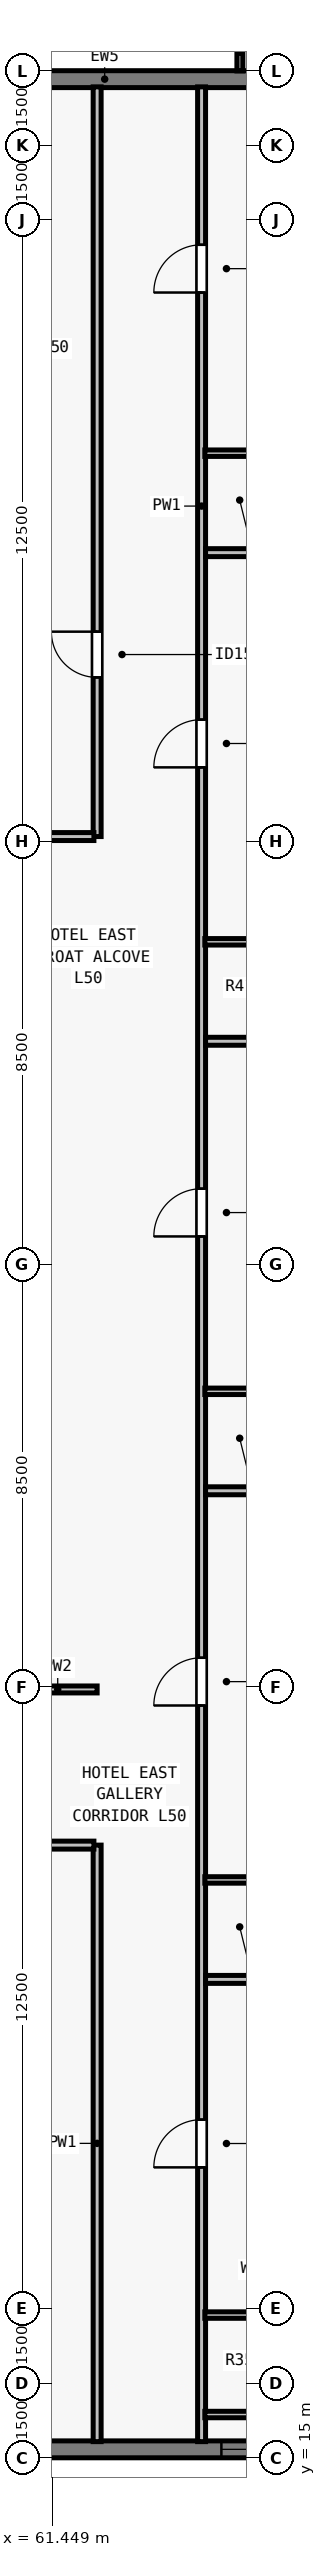
"""IFC4 building model, lengths in metres.
Left out: names, types, materials, properties, quantities, classifications, styles, units other than length and angle.
Written with IfcOpenShell. Run it as: python <this file> out.ifc"""

import sys

from ifc_helpers import new_model, si_unit, direction, frame, frame_2d, origin, place, context, subcontext, project, spatial, rectangle, extrude, element, fill, save


model = new_model("IFC4")
c1 = context("Model", 3, precision=1e-05, world=origin(), true_north=direction((0.0, 1.0)))
c2 = subcontext(c1, "Body", "Model", "MODEL_VIEW")
j1 = project(units=[si_unit("LENGTHUNIT", "METRE"), si_unit("PLANEANGLEUNIT", "RADIAN")], contexts=[c1])
p1 = place(None, origin())
s1 = spatial("IfcSite", under=j1, at=p1, CompositionType="ELEMENT")
p2 = place(p1, origin())
s2 = spatial("IfcBuilding", under=s1, at=p2, CompositionType="ELEMENT")
p3 = place(p2, frame((0.0, 0.0, 183.0)))
s3 = spatial("IfcBuildingStorey", under=s2, at=p3, CompositionType="ELEMENT", Elevation=183.0)
p4 = place(p3, frame((72.0, 15.17, 0.0), z_axis=(0.0, 0.0, 1.0), x_axis=(-1.0, 0.0, 0.0)))
e1 = element("IfcWall", 1, at=p4, inside=s3, PredefinedType="SOLIDWALL", context=c2, shape_type="SweptSolid", body=[
    extrude(rectangle(XDim=39.682, YDim=0.34, at=frame_2d((19.841, 0.0))), origin(), (0.0, 0.0, 1.0), 3.28),
])
p5 = place(p4, frame((5.802, 0.0, 0.8)))
e2 = element("IfcOpeningElement", 2, at=p5, cuts=e1, PredefinedType="OPENING", context=c2, shape_type="SweptSolid", body=[
    extrude(rectangle(XDim=1.35, YDim=1.66, at=frame_2d((0.675, 0.83))), frame((0.0, 0.18, 0.0), z_axis=(0.0, -1.0, 0.0), x_axis=(1.0, 0.0, 0.0)), (0.0, 0.0, 1.0), 0.36),
])
p6 = place(p4, frame((12.059, 0.0, 0.8)))
e3 = element("IfcOpeningElement", 3, at=p6, cuts=e1, PredefinedType="OPENING", context=c2, shape_type="SweptSolid", body=[
    extrude(rectangle(XDim=1.35, YDim=1.66, at=frame_2d((0.675, 0.83))), frame((0.0, 0.18, 0.0), z_axis=(0.0, -1.0, 0.0), x_axis=(1.0, 0.0, 0.0)), (0.0, 0.0, 1.0), 0.36),
])
p7 = place(p4, frame((19.166, 0.0, 0.8)))
e4 = element("IfcOpeningElement", 4, at=p7, cuts=e1, PredefinedType="OPENING", context=c2, shape_type="SweptSolid", body=[
    extrude(rectangle(XDim=1.35, YDim=1.66, at=frame_2d((0.675, 0.83))), frame((0.0, 0.18, 0.0), z_axis=(0.0, -1.0, 0.0), x_axis=(1.0, 0.0, 0.0)), (0.0, 0.0, 1.0), 0.36),
])
p8 = place(p4, frame((21.67, 0.0, 0.8)))
e5 = element("IfcOpeningElement", 5, at=p8, cuts=e1, PredefinedType="OPENING", context=c2, shape_type="SweptSolid", body=[
    extrude(rectangle(XDim=1.75, YDim=1.66, at=frame_2d((0.875, 0.83))), frame((0.0, 0.18, 0.0), z_axis=(0.0, -1.0, 0.0), x_axis=(1.0, 0.0, 0.0)), (0.0, 0.0, 1.0), 0.36),
])
p9 = place(p4, frame((26.273, 0.0, 0.8)))
e6 = element("IfcOpeningElement", 6, at=p9, cuts=e1, PredefinedType="OPENING", context=c2, shape_type="SweptSolid", body=[
    extrude(rectangle(XDim=1.35, YDim=1.66, at=frame_2d((0.675, 0.83))), frame((0.0, 0.18, 0.0), z_axis=(0.0, -1.0, 0.0), x_axis=(1.0, 0.0, 0.0)), (0.0, 0.0, 1.0), 0.36),
])
p10 = place(p4, frame((29.627, 0.0, 0.8)))
e7 = element("IfcOpeningElement", 7, at=p10, cuts=e1, PredefinedType="OPENING", context=c2, shape_type="SweptSolid", body=[
    extrude(rectangle(XDim=1.75, YDim=1.66, at=frame_2d((0.875, 0.83))), frame((0.0, 0.18, 0.0), z_axis=(0.0, -1.0, 0.0), x_axis=(1.0, 0.0, 0.0)), (0.0, 0.0, 1.0), 0.36),
])
p11 = place(p3, frame((32.0, 62.83, 0.0), z_axis=(0.0, 0.0, 1.0), x_axis=(1.0, 0.0, 0.0)))
e8 = element("IfcWall", 8, at=p11, inside=s3, PredefinedType="SOLIDWALL", context=c2, shape_type="SweptSolid", body=[
    extrude(rectangle(XDim=39.682, YDim=0.34, at=frame_2d((19.841, 0.0))), origin(), (0.0, 0.0, 1.0), 3.28),
])
p12 = place(p11, frame((4.102, 0.0, 0.8)))
e9 = element("IfcOpeningElement", 9, at=p12, cuts=e8, PredefinedType="OPENING", context=c2, shape_type="SweptSolid", body=[
    extrude(rectangle(XDim=1.35, YDim=1.66, at=frame_2d((0.675, 0.83))), frame((0.0, 0.18, 0.0), z_axis=(0.0, -1.0, 0.0), x_axis=(1.0, 0.0, 0.0)), (0.0, 0.0, 1.0), 0.36),
])
p13 = place(p11, frame((8.755, 0.0, 0.8)))
e10 = element("IfcOpeningElement", 10, at=p13, cuts=e8, PredefinedType="OPENING", context=c2, shape_type="SweptSolid", body=[
    extrude(rectangle(XDim=1.75, YDim=1.66, at=frame_2d((0.875, 0.83))), frame((0.0, 0.18, 0.0), z_axis=(0.0, -1.0, 0.0), x_axis=(1.0, 0.0, 0.0)), (0.0, 0.0, 1.0), 0.36),
])
p14 = place(p11, frame((12.059, 0.0, 0.8)))
e11 = element("IfcOpeningElement", 11, at=p14, cuts=e8, PredefinedType="OPENING", context=c2, shape_type="SweptSolid", body=[
    extrude(rectangle(XDim=1.35, YDim=1.66, at=frame_2d((0.675, 0.83))), frame((0.0, 0.18, 0.0), z_axis=(0.0, -1.0, 0.0), x_axis=(1.0, 0.0, 0.0)), (0.0, 0.0, 1.0), 0.36),
])
p15 = place(p11, frame((16.262, 0.0, 0.8)))
e12 = element("IfcOpeningElement", 12, at=p15, cuts=e8, PredefinedType="OPENING", context=c2, shape_type="SweptSolid", body=[
    extrude(rectangle(XDim=1.75, YDim=1.66, at=frame_2d((0.875, 0.83))), frame((0.0, 0.18, 0.0), z_axis=(0.0, -1.0, 0.0), x_axis=(1.0, 0.0, 0.0)), (0.0, 0.0, 1.0), 0.36),
])
p16 = place(p11, frame((18.316, 0.0, 0.8)))
e13 = element("IfcOpeningElement", 13, at=p16, cuts=e8, PredefinedType="OPENING", context=c2, shape_type="SweptSolid", body=[
    extrude(rectangle(XDim=1.35, YDim=1.66, at=frame_2d((0.675, 0.83))), frame((0.0, 0.18, 0.0), z_axis=(0.0, -1.0, 0.0), x_axis=(1.0, 0.0, 0.0)), (0.0, 0.0, 1.0), 0.36),
])
p17 = place(p11, frame((22.07, 0.0, 0.8)))
e14 = element("IfcOpeningElement", 14, at=p17, cuts=e8, PredefinedType="OPENING", context=c2, shape_type="SweptSolid", body=[
    extrude(rectangle(XDim=1.75, YDim=1.66, at=frame_2d((0.875, 0.83))), frame((0.0, 0.18, 0.0), z_axis=(0.0, -1.0, 0.0), x_axis=(1.0, 0.0, 0.0)), (0.0, 0.0, 1.0), 0.36),
])
p18 = place(p11, frame((26.273, 0.0, 0.8)))
e15 = element("IfcOpeningElement", 15, at=p18, cuts=e8, PredefinedType="OPENING", context=c2, shape_type="SweptSolid", body=[
    extrude(rectangle(XDim=1.35, YDim=1.66, at=frame_2d((0.675, 0.83))), frame((0.0, 0.18, 0.0), z_axis=(0.0, -1.0, 0.0), x_axis=(1.0, 0.0, 0.0)), (0.0, 0.0, 1.0), 0.36),
])
p19 = place(p11, frame((33.38, 0.0, 0.8)))
e16 = element("IfcOpeningElement", 16, at=p19, cuts=e8, PredefinedType="OPENING", context=c2, shape_type="SweptSolid", body=[
    extrude(rectangle(XDim=1.35, YDim=1.66, at=frame_2d((0.675, 0.83))), frame((0.0, 0.18, 0.0), z_axis=(0.0, -1.0, 0.0), x_axis=(1.0, 0.0, 0.0)), (0.0, 0.0, 1.0), 0.36),
])
p20 = place(p3, frame((64.45, 15.325, 0.0), z_axis=(0.0, 0.0, 1.0), x_axis=(0.0, 1.0, 0.0)))
e17 = element("IfcWall", 17, at=p20, inside=s3, PredefinedType="PARTITIONING", context=c2, shape_type="SweptSolid", body=[
    extrude(rectangle(XDim=47.35, YDim=0.16, at=frame_2d((23.675, 0.0))), origin(), (0.0, 0.0, 1.0), 2.555),
])
p21 = place(p20, frame((5.515, 0.0, 0.0)))
e18 = element("IfcOpeningElement", 18, at=p21, cuts=e17, PredefinedType="OPENING", context=c2, shape_type="SweptSolid", body=[
    extrude(rectangle(XDim=0.96, YDim=2.15, at=frame_2d((0.48, 1.075))), frame((0.0, 0.09, 0.0), z_axis=(0.0, -1.0, 0.0), x_axis=(1.0, 0.0, 0.0)), (0.0, 0.0, 1.0), 0.18),
])
p22 = place(p20, frame((14.802, 0.0, 0.0)))
e19 = element("IfcOpeningElement", 19, at=p22, cuts=e17, PredefinedType="OPENING", context=c2, shape_type="SweptSolid", body=[
    extrude(rectangle(XDim=0.96, YDim=2.15, at=frame_2d((0.48, 1.075))), frame((0.0, 0.09, 0.0), z_axis=(0.0, -1.0, 0.0), x_axis=(1.0, 0.0, 0.0)), (0.0, 0.0, 1.0), 0.18),
])
p23 = place(p20, frame((24.234, 0.0, 0.0)))
e20 = element("IfcOpeningElement", 20, at=p23, cuts=e17, PredefinedType="OPENING", context=c2, shape_type="SweptSolid", body=[
    extrude(rectangle(XDim=0.96, YDim=2.15, at=frame_2d((0.48, 1.075))), frame((0.0, 0.09, 0.0), z_axis=(0.0, -1.0, 0.0), x_axis=(1.0, 0.0, 0.0)), (0.0, 0.0, 1.0), 0.18),
])
p24 = place(p20, frame((33.666, 0.0, 0.0)))
e21 = element("IfcOpeningElement", 21, at=p24, cuts=e17, PredefinedType="OPENING", context=c2, shape_type="SweptSolid", body=[
    extrude(rectangle(XDim=0.96, YDim=2.15, at=frame_2d((0.48, 1.075))), frame((0.0, 0.09, 0.0), z_axis=(0.0, -1.0, 0.0), x_axis=(1.0, 0.0, 0.0)), (0.0, 0.0, 1.0), 0.18),
])
p25 = place(p20, frame((43.214, 0.0, 0.0)))
e22 = element("IfcOpeningElement", 22, at=p25, cuts=e17, PredefinedType="OPENING", context=c2, shape_type="SweptSolid", body=[
    extrude(rectangle(XDim=0.96, YDim=2.15, at=frame_2d((0.48, 1.075))), frame((0.0, 0.09, 0.0), z_axis=(0.0, -1.0, 0.0), x_axis=(1.0, 0.0, 0.0)), (0.0, 0.0, 1.0), 0.18),
])
p26 = place(p3, frame((62.35, 15.325, 0.0), z_axis=(0.0, 0.0, 1.0), x_axis=(0.0, 1.0, 0.0)))
e23 = element("IfcWall", 23, at=p26, inside=s3, PredefinedType="PARTITIONING", context=c2, shape_type="SweptSolid", body=[
    extrude(rectangle(XDim=11.995, YDim=0.16, at=frame_2d((5.998, 0.0))), origin(), (0.0, 0.0, 1.0), 3.28),
])
p27 = place(p3, frame((62.35, 47.6, 0.0), z_axis=(0.0, 0.0, 1.0), x_axis=(0.0, 1.0, 0.0)))
e24 = element("IfcWall", 24, at=p27, inside=s3, PredefinedType="PARTITIONING", context=c2, shape_type="SweptSolid", body=[
    extrude(rectangle(XDim=15.075, YDim=0.16, at=frame_2d((7.538, 0.0))), origin(), (0.0, 0.0, 1.0), 2.555),
])
p28 = place(p27, frame((3.2, 0.0, 0.0)))
e25 = element("IfcOpeningElement", 25, at=p28, cuts=e24, PredefinedType="OPENING", context=c2, shape_type="SweptSolid", body=[
    extrude(rectangle(XDim=0.92, YDim=2.12, at=frame_2d((0.46, 1.06))), frame((0.0, 0.09, 0.0), z_axis=(0.0, -1.0, 0.0), x_axis=(1.0, 0.0, 0.0)), (0.0, 0.0, 1.0), 0.18),
])
p29 = place(p3, frame((60.765, 30.45, 0.0), z_axis=(0.0, 0.0, 1.0), x_axis=(1.0, 0.0, 0.0)))
e26 = element("IfcWall", 26, at=p29, inside=s3, PredefinedType="PARTITIONING", context=c2, shape_type="SweptSolid", body=[
    extrude(rectangle(XDim=1.585, YDim=0.14, at=frame_2d((0.792, 0.0))), origin(), (0.0, 0.0, 1.0), 3.28),
])
p30 = place(p3, frame((60.765, 47.6, 0.0), z_axis=(0.0, 0.0, 1.0), x_axis=(1.0, 0.0, 0.0)))
e27 = element("IfcWall", 27, at=p30, inside=s3, PredefinedType="PARTITIONING", context=c2, shape_type="SweptSolid", body=[
    extrude(rectangle(XDim=1.52, YDim=0.16, at=frame_2d((0.76, 0.0))), origin(), (0.0, 0.0, 1.0), 3.28),
])
p31 = place(p3, frame((40.215, 27.32, 0.0), z_axis=(0.0, 0.0, 1.0), x_axis=(1.0, 0.0, 0.0)))
e28 = element("IfcWall", 28, at=p31, inside=s3, PredefinedType="PARTITIONING", context=c2, shape_type="SweptSolid", body=[
    extrude(rectangle(XDim=22.07, YDim=0.16, at=frame_2d((11.035, 0.0))), origin(), (0.0, 0.0, 1.0), 3.28),
])
p32 = place(p31, frame((3.587, 0.0, 0.0)))
e29 = element("IfcOpeningElement", 29, at=p32, cuts=e28, PredefinedType="OPENING", context=c2, shape_type="SweptSolid", body=[
    extrude(rectangle(XDim=0.96, YDim=2.12, at=frame_2d((0.48, 1.06))), frame((0.0, 0.09, 0.0), z_axis=(0.0, -1.0, 0.0), x_axis=(1.0, 0.0, 0.0)), (0.0, 0.0, 1.0), 0.18),
])
p33 = place(p31, frame((10.61, 0.0, 0.0)))
e30 = element("IfcOpeningElement", 30, at=p33, cuts=e28, PredefinedType="OPENING", context=c2, shape_type="SweptSolid", body=[
    extrude(rectangle(XDim=0.96, YDim=2.12, at=frame_2d((0.48, 1.06))), frame((0.0, 0.09, 0.0), z_axis=(0.0, -1.0, 0.0), x_axis=(1.0, 0.0, 0.0)), (0.0, 0.0, 1.0), 0.18),
])
p34 = place(p31, frame((17.578, 0.0, 0.0)))
e31 = element("IfcOpeningElement", 31, at=p34, cuts=e28, PredefinedType="OPENING", context=c2, shape_type="SweptSolid", body=[
    extrude(rectangle(XDim=0.96, YDim=2.12, at=frame_2d((0.48, 1.06))), frame((0.0, 0.09, 0.0), z_axis=(0.0, -1.0, 0.0), x_axis=(1.0, 0.0, 0.0)), (0.0, 0.0, 1.0), 0.18),
])
for number, where, z_axis, x_axis in (
    (32, (64.515, 15.87, 0.0), (0.0, 0.0, 1.0), (1.0, 0.0, 0.0)),
    (33, (64.515, 17.87, 0.0), (0.0, 0.0, 1.0), (1.0, 0.0, 0.0)),
):
    element("IfcWall", number, at=place(p3, frame(where, z_axis=z_axis, x_axis=x_axis)), inside=s3, PredefinedType="PLUMBINGWALL", context=c2, shape_type="SweptSolid", body=[
        extrude(rectangle(XDim=2.315, YDim=0.13, at=frame_2d((1.158, 0.0))), origin(), (0.0, 0.0, 1.0), 3.28),
    ])
p35 = place(p3, frame((64.53, 24.62, 0.0), z_axis=(0.0, 0.0, 1.0), x_axis=(1.0, 0.0, 0.0)))
e34 = element("IfcWall", 34, at=p35, inside=s3, PredefinedType="PARTITIONING", context=c2, shape_type="SweptSolid", body=[
    extrude(rectangle(XDim=11.145, YDim=0.16, at=frame_2d((5.573, 0.0))), origin(), (0.0, 0.0, 1.0), 2.896),
])
p36 = place(p3, frame((64.515, 26.62, 0.0), z_axis=(0.0, 0.0, 1.0), x_axis=(1.0, 0.0, 0.0)))
e35 = element("IfcWall", 35, at=p36, inside=s3, PredefinedType="PLUMBINGWALL", context=c2, shape_type="SweptSolid", body=[
    extrude(rectangle(XDim=2.315, YDim=0.13, at=frame_2d((1.158, 0.0))), origin(), (0.0, 0.0, 1.0), 2.896),
])
p37 = place(p3, frame((64.53, 34.445, 0.0), z_axis=(0.0, 0.0, 1.0), x_axis=(1.0, 0.0, 0.0)))
e36 = element("IfcWall", 36, at=p37, inside=s3, PredefinedType="PARTITIONING", context=c2, shape_type="SweptSolid", body=[
    extrude(rectangle(XDim=9.208, YDim=0.16, at=frame_2d((4.604, 0.0))), origin(), (0.0, 0.0, 1.0), 3.28),
])
p38 = place(p3, frame((64.515, 36.445, 0.0), z_axis=(0.0, 0.0, 1.0), x_axis=(1.0, 0.0, 0.0)))
e37 = element("IfcWall", 37, at=p38, inside=s3, PredefinedType="PLUMBINGWALL", context=c2, shape_type="SweptSolid", body=[
    extrude(rectangle(XDim=2.315, YDim=0.13, at=frame_2d((1.158, 0.0))), origin(), (0.0, 0.0, 1.0), 3.28),
])
p39 = place(p3, frame((64.53, 43.484, 0.0), z_axis=(0.0, 0.0, 1.0), x_axis=(1.0, 0.0, 0.0)))
e38 = element("IfcWall", 38, at=p39, inside=s3, PredefinedType="PARTITIONING", context=c2, shape_type="SweptSolid", body=[
    extrude(rectangle(XDim=11.145, YDim=0.16, at=frame_2d((5.573, 0.0))), origin(), (0.0, 0.0, 1.0), 3.28),
])
p40 = place(p3, frame((64.515, 45.484, 0.0), z_axis=(0.0, 0.0, 1.0), x_axis=(1.0, 0.0, 0.0)))
e39 = element("IfcWall", 39, at=p40, inside=s3, PredefinedType="PLUMBINGWALL", context=c2, shape_type="SweptSolid", body=[
    extrude(rectangle(XDim=2.315, YDim=0.13, at=frame_2d((1.158, 0.0))), origin(), (0.0, 0.0, 1.0), 3.28),
])
p41 = place(p3, frame((64.53, 53.309, 0.0), z_axis=(0.0, 0.0, 1.0), x_axis=(1.0, 0.0, 0.0)))
e40 = element("IfcWall", 40, at=p41, inside=s3, PredefinedType="PARTITIONING", context=c2, shape_type="SweptSolid", body=[
    extrude(rectangle(XDim=11.145, YDim=0.16, at=frame_2d((5.573, 0.0))), origin(), (0.0, 0.0, 1.0), 2.896),
])
p42 = place(p3, frame((64.515, 55.309, 0.0), z_axis=(0.0, 0.0, 1.0), x_axis=(1.0, 0.0, 0.0)))
e41 = element("IfcWall", 41, at=p42, inside=s3, PredefinedType="PLUMBINGWALL", context=c2, shape_type="SweptSolid", body=[
    extrude(rectangle(XDim=2.315, YDim=0.13, at=frame_2d((1.158, 0.0))), origin(), (0.0, 0.0, 1.0), 3.28),
])
p43 = place(p5, origin())
e42 = element("IfcWindow", 42, at=p43, inside=s3, PartitioningType="SINGLE_PANEL", PredefinedType="WINDOW", context=c2, shape_type="SweptSolid", body=[
    extrude(rectangle(XDim=1.35, YDim=1.66, at=frame_2d((0.675, 0.83))), frame((0.0, -0.05, 0.0), z_axis=(0.0, -1.0, 0.0), x_axis=(1.0, 0.0, 0.0)), (0.0, 0.0, 1.0), 0.06),
])
fill(e2, e42)
p44 = place(p28, origin())
e43 = element("IfcDoor", 43, at=p44, inside=s3, OperationType="SINGLE_SWING_RIGHT", PredefinedType="DOOR", context=c2, shape_type="SweptSolid", body=[
    extrude(rectangle(XDim=0.92, YDim=2.12, at=frame_2d((0.46, 1.06))), frame((0.0, 0.025, 0.0), z_axis=(0.0, -1.0, 0.0), x_axis=(1.0, 0.0, 0.0)), (0.0, 0.0, 1.0), 0.05),
])
fill(e25, e43)
p45 = place(p21, origin())
e44 = element("IfcDoor", 44, at=p45, inside=s3, OperationType="SINGLE_SWING_LEFT", PredefinedType="DOOR", context=c2, shape_type="SweptSolid", body=[
    extrude(rectangle(XDim=0.96, YDim=2.15, at=frame_2d((0.48, 1.075))), frame((0.0, 0.025, 0.0), z_axis=(0.0, -1.0, 0.0), x_axis=(1.0, 0.0, 0.0)), (0.0, 0.0, 1.0), 0.05),
])
fill(e18, e44)
p46 = place(p22, origin())
e45 = element("IfcDoor", 45, at=p46, inside=s3, OperationType="SINGLE_SWING_LEFT", PredefinedType="DOOR", context=c2, shape_type="SweptSolid", body=[
    extrude(rectangle(XDim=0.96, YDim=2.15, at=frame_2d((0.48, 1.075))), frame((0.0, 0.025, 0.0), z_axis=(0.0, -1.0, 0.0), x_axis=(1.0, 0.0, 0.0)), (0.0, 0.0, 1.0), 0.05),
])
fill(e19, e45)
p47 = place(p23, origin())
e46 = element("IfcDoor", 46, at=p47, inside=s3, OperationType="SINGLE_SWING_LEFT", PredefinedType="DOOR", context=c2, shape_type="SweptSolid", body=[
    extrude(rectangle(XDim=0.96, YDim=2.15, at=frame_2d((0.48, 1.075))), frame((0.0, 0.025, 0.0), z_axis=(0.0, -1.0, 0.0), x_axis=(1.0, 0.0, 0.0)), (0.0, 0.0, 1.0), 0.05),
])
fill(e20, e46)
p48 = place(p24, origin())
e47 = element("IfcDoor", 47, at=p48, inside=s3, OperationType="SINGLE_SWING_LEFT", PredefinedType="DOOR", context=c2, shape_type="SweptSolid", body=[
    extrude(rectangle(XDim=0.96, YDim=2.15, at=frame_2d((0.48, 1.075))), frame((0.0, 0.025, 0.0), z_axis=(0.0, -1.0, 0.0), x_axis=(1.0, 0.0, 0.0)), (0.0, 0.0, 1.0), 0.05),
])
fill(e21, e47)
p49 = place(p25, origin())
e48 = element("IfcDoor", 48, at=p49, inside=s3, OperationType="SINGLE_SWING_LEFT", PredefinedType="DOOR", context=c2, shape_type="SweptSolid", body=[
    extrude(rectangle(XDim=0.96, YDim=2.15, at=frame_2d((0.48, 1.075))), frame((0.0, 0.025, 0.0), z_axis=(0.0, -1.0, 0.0), x_axis=(1.0, 0.0, 0.0)), (0.0, 0.0, 1.0), 0.05),
])
fill(e22, e48)
save(model, sys.argv[1])
